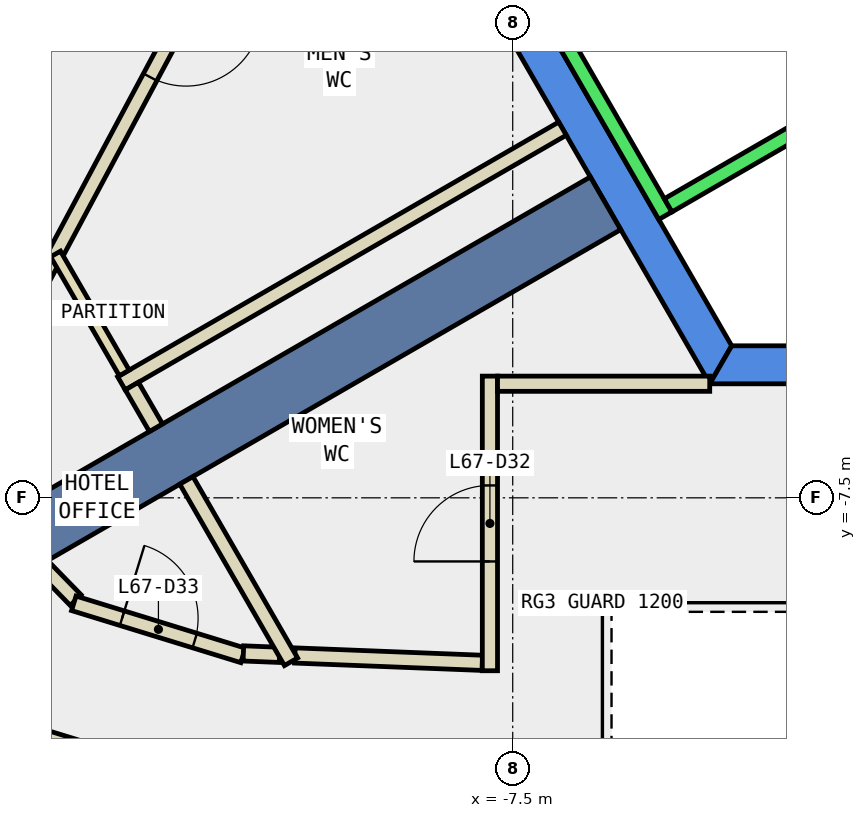
"""IFC4 building model, lengths in metres.
Left out: names, types, materials, properties, quantities, classifications, styles, units other than length and angle.
Written with IfcOpenShell. Run it as: python <this file> out.ifc"""

import sys

from ifc_helpers import new_model, si_unit, direction, frame, frame_2d, origin, place, context, subcontext, project, spatial, polyline, rectangle, outline, extrude, element, fill, save


model = new_model("IFC4")
c1 = context("Model", 3, precision=1e-05, world=origin(), true_north=direction((0.0, 1.0)))
c2 = subcontext(c1, "Body", "Model", "MODEL_VIEW")
j1 = project(units=[si_unit("LENGTHUNIT", "METRE"), si_unit("PLANEANGLEUNIT", "RADIAN")], contexts=[c1])
p1 = place(None, origin())
s1 = spatial("IfcSite", under=j1, at=p1, CompositionType="ELEMENT")
p2 = place(p1, origin())
s2 = spatial("IfcBuilding", under=s1, at=p2, CompositionType="ELEMENT")
p3 = place(p2, frame((0.0, 0.0, 290.0)))
s3 = spatial("IfcBuildingStorey", under=s2, at=p3, CompositionType="ELEMENT", Elevation=290.0)
p4 = place(p3, frame((0.0, 0.0, -0.34)))
e1 = element("IfcWall", 1, at=p4, inside=s3, PredefinedType="SHEAR", context=c2, shape_type="SweptSolid", body=[
    extrude(outline(polyline([(-9.815, 2.5), (-4.907, -6.0), (-4.619, -5.5), (-9.238, 2.5), (-9.815, 2.5)])), origin(), (0.0, 0.0, 1.0), 3.6),
])
p5 = place(p3, frame((0.0, 0.0, -0.34)))
e2 = element("IfcWall", 2, at=p5, inside=s3, PredefinedType="SHEAR", context=c2, shape_type="SweptSolid", body=[
    extrude(outline(polyline([(3.75, -6.0), (3.75, -5.5), (-4.619, -5.5), (-4.907, -6.0), (3.75, -6.0)])), origin(), (0.0, 0.0, 1.0), 3.6),
])
p6 = place(p3, frame((-6.279, -3.625, -0.34), z_axis=(0.0, 0.0, 1.0), x_axis=(-0.866017533419, -0.500013631625, 0.0)))
e3 = element("IfcWall", 3, at=p6, inside=s3, PredefinedType="SHEAR", context=c2, shape_type="SweptSolid", body=[
    extrude(rectangle(XDim=9.0, YDim=0.8, at=frame_2d((4.5, 0.0))), origin(), (0.0, 0.0, 1.0), 3.6),
])
p7 = place(p3, frame((-10.639, 1.084, 0.0), z_axis=(0.0, 0.0, 1.0), x_axis=(-0.471696599276, -0.881760918975, 0.0)))
e4 = element("IfcWall", 4, at=p7, inside=s3, PredefinedType="PARTITIONING", context=c2, shape_type="SweptSolid", body=[
    extrude(rectangle(XDim=6.172, YDim=0.2, at=frame_2d((3.086, 0.0))), origin(), (0.0, 0.0, 1.0), 3.26),
])
p8 = place(p7, frame((2.458, 0.0, 0.0)))
e5 = element("IfcOpeningElement", 5, at=p8, cuts=e4, PredefinedType="OPENING", context=c2, shape_type="SweptSolid", body=[
    extrude(rectangle(XDim=1.0, YDim=2.1, at=frame_2d((0.5, 1.05))), frame((0.0, 0.11, 0.0), z_axis=(0.0, -1.0, 0.0), x_axis=(1.0, 0.0, 0.0)), (0.0, 0.0, 1.0), 0.22),
])
p9 = place(p3, frame((-10.367, -9.574, 0.0), z_axis=(0.0, 0.0, 1.0), x_axis=(0.999229139158, -0.039257196264, 0.0)))
e6 = element("IfcWall", 6, at=p9, inside=s3, PredefinedType="PARTITIONING", context=c2, shape_type="SweptSolid", body=[
    extrude(rectangle(XDim=2.469, YDim=0.2, at=frame_2d((1.234, 0.0))), origin(), (0.0, 0.0, 1.0), 3.26),
])
p10 = place(p3, frame((-13.55, -4.358, 0.0), z_axis=(0.0, 0.0, 1.0), x_axis=(-0.472169364753, -0.881507850781, 0.0)))
e7 = element("IfcWall", 7, at=p10, inside=s3, PredefinedType="PARTITIONING", context=c2, shape_type="SweptSolid", body=[
    extrude(rectangle(XDim=0.521, YDim=0.2, at=frame_2d((0.26, 0.0))), origin(), (0.0, 0.0, 1.0), 3.26),
])
p11 = place(p3, frame((-13.69, -8.395, 0.0), z_axis=(0.0, 0.0, 1.0), x_axis=(0.698333537371, -0.715772499181, 0.0)))
e8 = element("IfcWall", 8, at=p11, inside=s3, PredefinedType="PARTITIONING", context=c2, shape_type="SweptSolid", body=[
    extrude(rectangle(XDim=0.63, YDim=0.2, at=frame_2d((0.315, 0.0))), origin(), (0.0, 0.0, 1.0), 3.26),
])
p12 = place(p3, frame((-13.275, -8.888, 0.0), z_axis=(0.0, 0.0, 1.0), x_axis=(0.955792602122, -0.294041666654, 0.0)))
e9 = element("IfcWall", 9, at=p12, inside=s3, PredefinedType="PARTITIONING", context=c2, shape_type="SweptSolid", body=[
    extrude(rectangle(XDim=2.33, YDim=0.2, at=frame_2d((1.165, 0.0))), origin(), (0.0, 0.0, 1.0), 3.26),
])
p13 = place(p12, frame((0.665, 0.0, 0.0)))
e10 = element("IfcOpeningElement", 10, at=p13, cuts=e9, PredefinedType="OPENING", context=c2, shape_type="SweptSolid", body=[
    extrude(rectangle(XDim=1.0, YDim=2.1, at=frame_2d((0.5, 1.05))), frame((0.0, 0.11, 0.0), z_axis=(0.0, -1.0, 0.0), x_axis=(1.0, 0.0, 0.0)), (0.0, 0.0, 1.0), 0.22),
])
p14 = place(p3, frame((-11.044, -9.547, 0.0), z_axis=(0.0, 0.0, 1.0), x_axis=(0.999224473046, -0.039375785274, 0.0)))
e11 = element("IfcWall", 11, at=p14, inside=s3, PredefinedType="PARTITIONING", context=c2, shape_type="SweptSolid", body=[
    extrude(rectangle(XDim=0.478, YDim=0.2, at=frame_2d((0.239, 0.0))), origin(), (0.0, 0.0, 1.0), 3.26),
])
p15 = place(p3, frame((-12.427, -11.032, 0.0), z_axis=(0.0, 0.0, 1.0), x_axis=(-0.955940341053, 0.293561006177, 0.0)))
e12 = element("IfcWall", 12, at=p15, inside=s3, PredefinedType="PARTITIONING", context=c2, shape_type="SweptSolid", body=[
    extrude(rectangle(XDim=1.7, YDim=0.2, at=frame_2d((0.85, 0.0))), origin(), (0.0, 0.0, 1.0), 3.26),
])
p16 = place(p3, frame((-7.8, -9.775, 0.0), z_axis=(0.0, 0.0, 1.0), x_axis=(0.0, 1.0, 0.0)))
e13 = element("IfcWall", 13, at=p16, inside=s3, PredefinedType="PARTITIONING", context=c2, shape_type="SweptSolid", body=[
    extrude(rectangle(XDim=3.876, YDim=0.2, at=frame_2d((1.938, 0.0))), origin(), (0.0, 0.0, 1.0), 3.26),
])
p17 = place(p16, frame((1.438, 0.0, 0.0)))
e14 = element("IfcOpeningElement", 14, at=p17, cuts=e13, PredefinedType="OPENING", context=c2, shape_type="SweptSolid", body=[
    extrude(rectangle(XDim=1.0, YDim=2.1, at=frame_2d((0.5, 1.05))), frame((0.0, 0.11, 0.0), z_axis=(0.0, -1.0, 0.0), x_axis=(1.0, 0.0, 0.0)), (0.0, 0.0, 1.0), 0.22),
])
p18 = place(p3, frame((-7.7, -5.999, 0.0), z_axis=(0.0, 0.0, 1.0), x_axis=(1.0, 0.0, 0.0)))
e15 = element("IfcWall", 15, at=p18, inside=s3, PredefinedType="PARTITIONING", context=c2, shape_type="SweptSolid", body=[
    extrude(rectangle(XDim=2.792, YDim=0.2, at=frame_2d((1.396, 0.0))), origin(), (0.0, 0.0, 1.0), 3.26),
])
p19 = place(p3, frame((-6.845, -2.643, 0.0), z_axis=(0.0, 0.0, 1.0), x_axis=(-0.865994457699, -0.500053596362, 0.0)))
e16 = element("IfcWall", 16, at=p19, inside=s3, PredefinedType="PARTITIONING", context=c2, shape_type="SweptSolid", body=[
    extrude(rectangle(XDim=6.701, YDim=0.2, at=frame_2d((3.351, 0.0))), origin(), (0.0, 0.0, 1.0), 3.26),
])
p20 = place(p3, frame((-12.611, -5.857, 0.0), z_axis=(0.0, 0.0, 1.0), x_axis=(-0.500120037633, 0.865956088932, 0.0)))
e17 = element("IfcWall", 17, at=p20, inside=s3, PredefinedType="PARTITIONING", context=c2, shape_type="SweptSolid", body=[
    extrude(rectangle(XDim=1.807, YDim=0.15, at=frame_2d((0.904, 0.0))), origin(), (0.0, 0.0, 1.0), 3.26),
])
p21 = place(p3, frame((-10.417, -9.657, 0.0), z_axis=(0.0, 0.0, 1.0), x_axis=(-0.499837531988, 0.866119184418, 0.0)))
e18 = element("IfcWall", 18, at=p21, inside=s3, PredefinedType="PARTITIONING", context=c2, shape_type="SweptSolid", body=[
    extrude(rectangle(XDim=2.755, YDim=0.2, at=frame_2d((1.377, 0.0))), origin(), (0.0, 0.0, 1.0), 3.26),
])
p22 = place(p3, frame((-12.194, -6.578, 0.0), z_axis=(0.0, 0.0, 1.0), x_axis=(-0.500701704226, 0.865619895442, 0.0)))
e19 = element("IfcWall", 19, at=p22, inside=s3, PredefinedType="PARTITIONING", context=c2, shape_type="SweptSolid", body=[
    extrude(rectangle(XDim=0.633, YDim=0.2, at=frame_2d((0.316, 0.0))), origin(), (0.0, 0.0, 1.0), 3.26),
])
p23 = place(p3, frame((-5.94, 2.188, 0.0), z_axis=(0.0, 0.0, 1.0), x_axis=(0.500034260056, -0.866005622828, 0.0)))
e20 = element("IfcWall", 20, at=p23, inside=s3, PredefinedType="STANDARD", context=c2, shape_type="SweptSolid", body=[
    extrude(rectangle(XDim=5.399, YDim=0.2, at=frame_2d((2.7, 0.0))), origin(), (0.0, 0.0, 1.0), 3.26),
])
p24 = place(p23, frame((3.075, 0.0, 0.0)))
e21 = element("IfcOpeningElement", 21, at=p24, cuts=e20, PredefinedType="OPENING", context=c2, shape_type="SweptSolid", body=[
    extrude(rectangle(XDim=1.1, YDim=2.1, at=frame_2d((0.55, 1.05))), frame((0.0, 0.11, 0.0), z_axis=(0.0, -1.0, 0.0), x_axis=(1.0, 0.0, 0.0)), (0.0, 0.0, 1.0), 0.22),
])
p25 = place(p23, frame((1.225, 0.0, 0.0)))
e22 = element("IfcOpeningElement", 22, at=p25, cuts=e20, PredefinedType="OPENING", context=c2, shape_type="SweptSolid", body=[
    extrude(rectangle(XDim=1.1, YDim=2.1, at=frame_2d((0.55, 1.05))), frame((0.0, 0.11, 0.0), z_axis=(0.0, -1.0, 0.0), x_axis=(1.0, 0.0, 0.0)), (0.0, 0.0, 1.0), 0.22),
])
p26 = place(p3, frame((-8.192, 0.888, 0.0), z_axis=(0.0, 0.0, 1.0), x_axis=(0.500034260056, -0.866005622828, 0.0)))
e23 = element("IfcWall", 23, at=p26, inside=s3, PredefinedType="STANDARD", context=c2, shape_type="SweptSolid", body=[
    extrude(rectangle(XDim=5.399, YDim=0.2, at=frame_2d((2.7, 0.0))), origin(), (0.0, 0.0, 1.0), 3.26),
])
p27 = place(p3, frame((-3.377, -2.452, 0.0), z_axis=(0.0, 0.0, 1.0), x_axis=(-0.865955154139, -0.50012165622, 0.0)))
e24 = element("IfcWall", 24, at=p27, inside=s3, PredefinedType="STANDARD", context=c2, shape_type="SweptSolid", body=[
    extrude(rectangle(XDim=2.4, YDim=0.2, at=frame_2d((1.2, 0.0))), origin(), (0.0, 0.0, 1.0), 3.26),
])
p28 = place(p8, origin())
e25 = element("IfcDoor", 25, at=p28, inside=s3, OperationType="SINGLE_SWING_LEFT", PredefinedType="DOOR", context=c2, shape_type="SweptSolid", body=[
    extrude(rectangle(XDim=1.0, YDim=2.1, at=frame_2d((0.5, 1.05))), frame((0.0, 0.025, 0.0), z_axis=(0.0, -1.0, 0.0), x_axis=(1.0, 0.0, 0.0)), (0.0, 0.0, 1.0), 0.05),
])
fill(e5, e25)
p29 = place(p17, origin())
e26 = element("IfcDoor", 26, at=p29, inside=s3, OperationType="SINGLE_SWING_LEFT", PredefinedType="DOOR", context=c2, shape_type="SweptSolid", body=[
    extrude(rectangle(XDim=1.0, YDim=2.1, at=frame_2d((0.5, 1.05))), frame((0.0, 0.025, 0.0), z_axis=(0.0, -1.0, 0.0), x_axis=(1.0, 0.0, 0.0)), (0.0, 0.0, 1.0), 0.05),
])
fill(e14, e26)
p30 = place(p13, origin())
e27 = element("IfcDoor", 27, at=p30, inside=s3, OperationType="SINGLE_SWING_LEFT", PredefinedType="DOOR", context=c2, shape_type="SweptSolid", body=[
    extrude(rectangle(XDim=1.0, YDim=2.1, at=frame_2d((0.5, 1.05))), frame((0.0, 0.025, 0.0), z_axis=(0.0, -1.0, 0.0), x_axis=(1.0, 0.0, 0.0)), (0.0, 0.0, 1.0), 0.05),
])
fill(e10, e27)
save(model, sys.argv[1])
